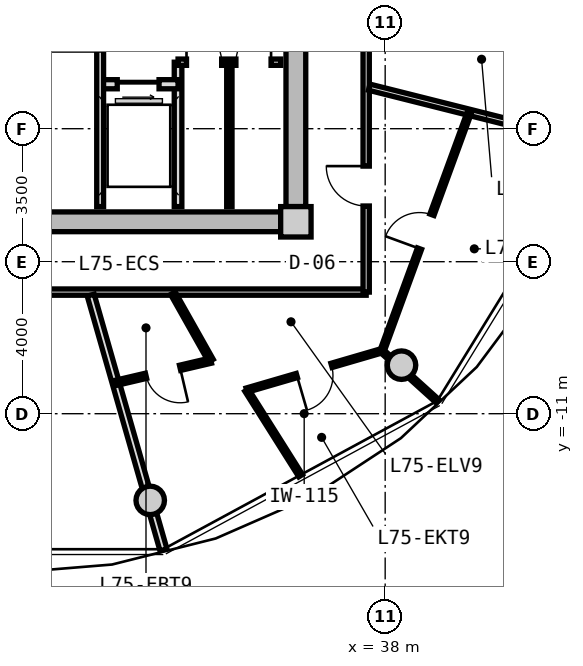
"""IFC4 building model, lengths in metres.
Left out: names, types, materials, properties, quantities, classifications, styles, units other than length and angle.
Written with IfcOpenShell. Run it as: python <this file> out.ifc"""

import sys

from ifc_helpers import new_model, si_unit, direction, frame, frame_2d, origin, origin_2d, place, context, subcontext, project, spatial, rectangle, circle, extrude, source, transform, mapped, element, fill, save


model = new_model("IFC4")
c1 = context("Model", 3, precision=1e-05, world=origin(), true_north=direction((0.0, 1.0)))
c2 = subcontext(c1, "Body", "Model", "MODEL_VIEW")
j1 = project(units=[si_unit("LENGTHUNIT", "METRE"), si_unit("PLANEANGLEUNIT", "RADIAN")], contexts=[c1])
p1 = place(None, origin())
s1 = spatial("IfcSite", under=j1, at=p1, CompositionType="ELEMENT")
p2 = place(p1, origin())
s2 = spatial("IfcBuilding", under=s1, at=p2, CompositionType="ELEMENT")
p3 = place(p2, frame((0.0, 0.0, 241.35)))
s3 = spatial("IfcBuildingStorey", under=s2, at=p3, CompositionType="ELEMENT", Elevation=241.35)
m1 = source(origin(), c2, "Body", "SweptSolid", [
    extrude(rectangle(XDim=0.8, YDim=0.8, at=origin_2d()), origin(), (0.0, 0.0, 1.0), 3.05),
])
p4 = place(p3, frame((35.65, -5.95, 0.0), z_axis=(0.0, 0.0, 1.0), x_axis=(1.0, 0.0, 0.0)))
e1 = element("IfcColumn", 1, at=p4, inside=s3, PredefinedType="COLUMN", context=c2, shape_type="MappedRepresentation", body=[
    mapped(m1, transform((0.0, 0.0, 0.0), x_axis=(1.0, 0.0, 0.0), y_axis=(0.0, 1.0, 0.0), z_axis=(0.0, 0.0, 1.0), scale=1.0)),
])
m2 = source(origin(), c2, "Body", "SweptSolid", [
    extrude(rectangle(XDim=14.5, YDim=0.52, at=frame_2d((7.25, 0.0))), origin(), (0.0, 0.0, 1.0), 2.73),
])
p5 = place(p3, frame((35.25, -5.95, 0.0), z_axis=(0.0, 0.0, 1.0), x_axis=(-1.0, 0.0, 0.0)))
e2 = element("IfcWall", 2, at=p5, inside=s3, PredefinedType="SHEAR", context=c2, shape_type="MappedRepresentation", body=[
    mapped(m2, transform((0.0, 0.0, 0.0), x_axis=(1.0, 0.0, 0.0), y_axis=(0.0, 1.0, 0.0), z_axis=(0.0, 0.0, 1.0), scale=1.0)),
])
m3 = source(origin(), c2, "Body", "SweptSolid", [
    extrude(rectangle(XDim=11.1, YDim=0.52, at=frame_2d((5.55, 0.0))), origin(), (0.0, 0.0, 1.0), 2.73),
])
p6 = place(p3, frame((35.65, 5.55, 0.0), z_axis=(0.0, 0.0, 1.0), x_axis=(0.0, -1.0, 0.0)))
e3 = element("IfcWall", 3, at=p6, inside=s3, PredefinedType="SHEAR", context=c2, shape_type="MappedRepresentation", body=[
    mapped(m3, transform((0.0, 0.0, 0.0), x_axis=(1.0, 0.0, 0.0), y_axis=(0.0, 1.0, 0.0), z_axis=(0.0, 0.0, 1.0), scale=1.0)),
])
p7 = place(p6, frame((5.65, 0.0, 0.0)))
e4 = element("IfcOpeningElement", 4, at=p7, cuts=e3, PredefinedType="OPENING", context=c2, shape_type="SweptSolid", body=[
    extrude(rectangle(XDim=1.2, YDim=2.15, at=frame_2d((0.6, 1.075))), frame((0.0, 0.27, 0.0), z_axis=(0.0, -1.0, 0.0), x_axis=(1.0, 0.0, 0.0)), (0.0, 0.0, 1.0), 0.54),
])
m4 = source(origin(), c2, "Body", "SweptSolid", [
    extrude(circle(Radius=0.375, at=origin_2d()), origin(), (0.0, 0.0, 1.0), 3.05),
])
for number, where, z_axis, x_axis in (
    (5, (31.818, -13.281, 0.0), (0.0, 0.0, 1.0), (1.0, 0.0, 0.0)),
    (6, (38.43, -9.723, 0.0), (0.0, 0.0, 1.0), (1.0, 0.0, 0.0)),
):
    element("IfcColumn", number, at=place(p3, frame(where, z_axis=z_axis, x_axis=x_axis)), inside=s3, PredefinedType="COLUMN", context=c2, shape_type="MappedRepresentation", body=[
        mapped(m4, transform((0.0, 0.0, 0.0), x_axis=(1.0, 0.0, 0.0), y_axis=(0.0, 1.0, 0.0), z_axis=(0.0, 0.0, 1.0), scale=1.0)),
    ])
m5 = source(origin(), c2, "Body", "SweptSolid", [
    extrude(rectangle(XDim=3.8, YDim=0.2, at=frame_2d((1.9, 0.0))), origin(), (0.0, 0.0, 1.0), 2.715),
])
p8 = place(p3, frame((32.55, -5.55, 0.0), z_axis=(0.0, 0.0, 1.0), x_axis=(0.0, 1.0, 0.0)))
e7 = element("IfcWall", 7, at=p8, inside=s3, PredefinedType="PARTITIONING", context=c2, shape_type="MappedRepresentation", body=[
    mapped(m5, transform((0.0, 0.0, 0.0), x_axis=(1.0, 0.0, 0.0), y_axis=(0.0, 1.0, 0.0), z_axis=(0.0, 0.0, 1.0), scale=1.0)),
])
m6 = source(origin(), c2, "Body", "SweptSolid", [
    extrude(rectangle(XDim=2.05, YDim=0.24, at=frame_2d((1.025, 0.0))), origin(), (0.0, 0.0, 1.0), 2.715),
])
p9 = place(p3, frame((30.5, -2.33, 0.0), z_axis=(0.0, 0.0, 1.0), x_axis=(1.0, 0.0, 0.0)))
e8 = element("IfcWall", 8, at=p9, inside=s3, PredefinedType="PARTITIONING", context=c2, shape_type="MappedRepresentation", body=[
    mapped(m6, transform((0.0, 0.0, 0.0), x_axis=(1.0, 0.0, 0.0), y_axis=(0.0, 1.0, 0.0), z_axis=(0.0, 0.0, 1.0), scale=1.0)),
])
p10 = place(p9, frame((0.45, 0.0, 0.0)))
e9 = element("IfcOpeningElement", 9, at=p10, cuts=e8, PredefinedType="OPENING", context=c2, shape_type="SweptSolid", body=[
    extrude(rectangle(XDim=1.1, YDim=2.2, at=frame_2d((0.55, 1.1))), frame((0.0, 0.13, 0.0), z_axis=(0.0, -1.0, 0.0), x_axis=(1.0, 0.0, 0.0)), (0.0, 0.0, 1.0), 0.26),
])
m7 = source(origin(), c2, "Body", "SweptSolid", [
    extrude(rectangle(XDim=4.2, YDim=0.18, at=frame_2d((2.1, 0.0))), origin(), (0.0, 0.0, 1.0), 2.715),
])
p11 = place(p3, frame((30.5, -5.55, 0.0), z_axis=(0.0, 0.0, 1.0), x_axis=(0.0, 1.0, 0.0)))
e10 = element("IfcWall", 10, at=p11, inside=s3, PredefinedType="PARTITIONING", context=c2, shape_type="MappedRepresentation", body=[
    mapped(m7, transform((0.0, 0.0, 0.0), x_axis=(1.0, 0.0, 0.0), y_axis=(0.0, 1.0, 0.0), z_axis=(0.0, 0.0, 1.0), scale=1.0)),
])
m8 = source(origin(), c2, "Body", "SweptSolid", [
    extrude(rectangle(XDim=2.7, YDim=0.165, at=frame_2d((1.35, 0.0))), origin(), (0.0, 0.0, 1.0), 2.715),
])
p12 = place(p3, frame((32.55, -1.75, 0.0), z_axis=(0.0, 0.0, 1.0), x_axis=(1.0, 0.0, 0.0)))
e11 = element("IfcWall", 11, at=p12, inside=s3, PredefinedType="PARTITIONING", context=c2, shape_type="MappedRepresentation", body=[
    mapped(m8, transform((0.0, 0.0, 0.0), x_axis=(1.0, 0.0, 0.0), y_axis=(0.0, 1.0, 0.0), z_axis=(0.0, 0.0, 1.0), scale=1.0)),
])
p13 = place(p12, frame((0.222, 0.0, 0.0)))
e12 = element("IfcOpeningElement", 12, at=p13, cuts=e11, PredefinedType="OPENING", context=c2, shape_type="SweptSolid", body=[
    extrude(rectangle(XDim=0.925, YDim=2.1, at=frame_2d((0.462, 1.05))), frame((0.0, 0.093, 0.0), z_axis=(0.0, -1.0, 0.0), x_axis=(1.0, 0.0, 0.0)), (0.0, 0.0, 1.0), 0.185),
])
p14 = place(p12, frame((1.522, 0.0, 0.0)))
e13 = element("IfcOpeningElement", 13, at=p14, cuts=e11, PredefinedType="OPENING", context=c2, shape_type="SweptSolid", body=[
    extrude(rectangle(XDim=0.925, YDim=2.1, at=frame_2d((0.462, 1.05))), frame((0.0, 0.093, 0.0), z_axis=(0.0, -1.0, 0.0), x_axis=(1.0, 0.0, 0.0)), (0.0, 0.0, 1.0), 0.185),
])
m9 = source(origin(), c2, "Body", "SweptSolid", [
    extrude(rectangle(XDim=3.8, YDim=0.14, at=frame_2d((1.9, 0.0))), origin(), (0.0, 0.0, 1.0), 2.715),
])
p15 = place(p3, frame((33.9, -5.55, 0.0), z_axis=(0.0, 0.0, 1.0), x_axis=(0.0, 1.0, 0.0)))
e14 = element("IfcWall", 14, at=p15, inside=s3, PredefinedType="PARTITIONING", context=c2, shape_type="MappedRepresentation", body=[
    mapped(m9, transform((0.0, 0.0, 0.0), x_axis=(1.0, 0.0, 0.0), y_axis=(0.0, 1.0, 0.0), z_axis=(0.0, 0.0, 1.0), scale=1.0)),
])
m10 = source(origin(), c2, "Body", "SweptSolid", [
    extrude(rectangle(XDim=19.0, YDim=0.165, at=frame_2d((9.5, 0.0))), origin(), (0.0, 0.0, 1.0), 2.715),
])
p16 = place(p3, frame((37.5, -7.8, 0.0), z_axis=(0.0, 0.0, 1.0), x_axis=(-1.0, 0.0, 0.0)))
e15 = element("IfcWall", 15, at=p16, inside=s3, PredefinedType="PARTITIONING", context=c2, shape_type="MappedRepresentation", body=[
    mapped(m10, transform((0.0, 0.0, 0.0), x_axis=(1.0, 0.0, 0.0), y_axis=(0.0, 1.0, 0.0), z_axis=(0.0, 0.0, 1.0), scale=1.0)),
])
p17 = place(p16, frame((12.373, 0.0, 0.0)))
e16 = element("IfcOpeningElement", 16, at=p17, cuts=e15, PredefinedType="OPENING", context=c2, shape_type="SweptSolid", body=[
    extrude(rectangle(XDim=1.25, YDim=2.2, at=frame_2d((0.625, 1.1))), frame((0.0, 0.093, 0.0), z_axis=(0.0, -1.0, 0.0), x_axis=(1.0, 0.0, 0.0)), (0.0, 0.0, 1.0), 0.185),
])
m11 = source(origin(), c2, "Body", "SweptSolid", [
    extrude(rectangle(XDim=6.88, YDim=0.165, at=frame_2d((3.44, 0.0))), origin(), (0.0, 0.0, 1.0), 2.715),
])
p18 = place(p3, frame((37.5, -0.92, 0.0), z_axis=(0.0, 0.0, 1.0), x_axis=(0.0, -1.0, 0.0)))
e17 = element("IfcWall", 17, at=p18, inside=s3, PredefinedType="PARTITIONING", context=c2, shape_type="MappedRepresentation", body=[
    mapped(m11, transform((0.0, 0.0, 0.0), x_axis=(1.0, 0.0, 0.0), y_axis=(0.0, 1.0, 0.0), z_axis=(0.0, 0.0, 1.0), scale=1.0)),
])
p19 = place(p18, frame((3.564, 0.0, 0.0)))
e18 = element("IfcOpeningElement", 18, at=p19, cuts=e17, PredefinedType="OPENING", context=c2, shape_type="SweptSolid", body=[
    extrude(rectangle(XDim=1.05, YDim=2.15, at=frame_2d((0.525, 1.075))), frame((0.0, 0.093, 0.0), z_axis=(0.0, -1.0, 0.0), x_axis=(1.0, 0.0, 0.0)), (0.0, 0.0, 1.0), 0.185),
])
m12 = source(origin(), c2, "Body", "SweptSolid", [
    extrude(rectangle(XDim=6.157, YDim=0.165, at=frame_2d((3.079, 0.0))), origin(), (0.0, 0.0, 1.0), 2.315),
])
p20 = place(p3, frame((37.58, -2.407, 0.0), z_axis=(0.0, 0.0, 1.0), x_axis=(0.969840867184, -0.243738984038, 0.0)))
e19 = element("IfcWall", 19, at=p20, inside=s3, PredefinedType="PARTITIONING", context=c2, shape_type="MappedRepresentation", body=[
    mapped(m12, transform((0.0, 0.0, 0.0), x_axis=(1.0, 0.0, 0.0), y_axis=(0.0, 1.0, 0.0), z_axis=(0.0, 0.0, 1.0), scale=1.0)),
])
m13 = source(origin(), c2, "Body", "SweptSolid", [
    extrude(rectangle(XDim=6.974, YDim=0.19, at=frame_2d((3.487, 0.0))), origin(), (0.0, 0.0, 1.0), 2.315),
])
p21 = place(p3, frame((30.251, -7.88, 0.0), z_axis=(0.0, 0.0, 1.0), x_axis=(0.274707256801, -0.961527910703, 0.0)))
e20 = element("IfcWall", 20, at=p21, inside=s3, PredefinedType="PARTITIONING", context=c2, shape_type="MappedRepresentation", body=[
    mapped(m13, transform((0.0, 0.0, 0.0), x_axis=(1.0, 0.0, 0.0), y_axis=(0.0, 1.0, 0.0), z_axis=(0.0, 0.0, 1.0), scale=1.0)),
])
m14 = source(origin(), c2, "Body", "SweptSolid", [
    extrude(rectangle(XDim=6.69, YDim=0.115, at=frame_2d((3.345, 0.0))), origin(), (0.0, 0.0, 1.0), 2.715),
])
p22 = place(p3, frame((37.917, -9.352, 0.0), z_axis=(0.0, 0.0, 1.0), x_axis=(0.343693784919, 0.939081776102, 0.0)))
e21 = element("IfcWall", 21, at=p22, inside=s3, PredefinedType="PARTITIONING", context=c2, shape_type="MappedRepresentation", body=[
    mapped(m14, transform((0.0, 0.0, 0.0), x_axis=(1.0, 0.0, 0.0), y_axis=(0.0, 1.0, 0.0), z_axis=(0.0, 0.0, 1.0), scale=1.0)),
])
p23 = place(p22, frame((2.87, 0.0, 0.0)))
e22 = element("IfcOpeningElement", 22, at=p23, cuts=e21, PredefinedType="OPENING", context=c2, shape_type="SweptSolid", body=[
    extrude(rectangle(XDim=0.95, YDim=2.1, at=frame_2d((0.475, 1.05))), frame((0.0, 0.067, 0.0), z_axis=(0.0, -1.0, 0.0), x_axis=(1.0, 0.0, 0.0)), (0.0, 0.0, 1.0), 0.135),
])
m15 = source(origin(), c2, "Body", "SweptSolid", [
    extrude(rectangle(XDim=1.977, YDim=0.115, at=frame_2d((0.989, 0.0))), origin(), (0.0, 0.0, 1.0), 2.315),
])
p24 = place(p3, frame((37.917, -9.352, 0.0), z_axis=(0.0, 0.0, 1.0), x_axis=(0.742064998629, -0.670327933037, 0.0)))
e23 = element("IfcWall", 23, at=p24, inside=s3, PredefinedType="PARTITIONING", context=c2, shape_type="MappedRepresentation", body=[
    mapped(m15, transform((0.0, 0.0, 0.0), x_axis=(1.0, 0.0, 0.0), y_axis=(0.0, 1.0, 0.0), z_axis=(0.0, 0.0, 1.0), scale=1.0)),
])
m16 = source(origin(), c2, "Body", "SweptSolid", [
    extrude(rectangle(XDim=2.035, YDim=0.14, at=frame_2d((1.018, 0.0))), origin(), (0.0, 0.0, 1.0), 2.715),
])
p25 = place(p3, frame((32.415, -7.83, 0.0), z_axis=(0.0, 0.0, 1.0), x_axis=(0.491092509169, -0.871107425888, 0.0)))
e24 = element("IfcWall", 24, at=p25, inside=s3, PredefinedType="PARTITIONING", context=c2, shape_type="MappedRepresentation", body=[
    mapped(m16, transform((0.0, 0.0, 0.0), x_axis=(1.0, 0.0, 0.0), y_axis=(0.0, 1.0, 0.0), z_axis=(0.0, 0.0, 1.0), scale=1.0)),
])
m17 = source(origin(), c2, "Body", "SweptSolid", [
    extrude(rectangle(XDim=2.586, YDim=0.14, at=frame_2d((1.293, 0.0))), origin(), (0.0, 0.0, 1.0), 2.715),
])
p26 = place(p3, frame((33.415, -9.603, 0.0), z_axis=(0.0, 0.0, 1.0), x_axis=(-0.973691298219, -0.227871138526, 0.0)))
e25 = element("IfcWall", 25, at=p26, inside=s3, PredefinedType="PARTITIONING", context=c2, shape_type="MappedRepresentation", body=[
    mapped(m17, transform((0.0, 0.0, 0.0), x_axis=(1.0, 0.0, 0.0), y_axis=(0.0, 1.0, 0.0), z_axis=(0.0, 0.0, 1.0), scale=1.0)),
])
p27 = place(p26, frame((0.833, 0.0, 0.0)))
e26 = element("IfcOpeningElement", 26, at=p27, cuts=e25, PredefinedType="OPENING", context=c2, shape_type="SweptSolid", body=[
    extrude(rectangle(XDim=0.92, YDim=2.1, at=frame_2d((0.46, 1.05))), frame((0.0, 0.08, 0.0), z_axis=(0.0, -1.0, 0.0), x_axis=(1.0, 0.0, 0.0)), (0.0, 0.0, 1.0), 0.16),
])
m18 = source(origin(), c2, "Body", "SweptSolid", [
    extrude(rectangle(XDim=2.662, YDim=0.115, at=frame_2d((1.331, 0.0))), origin(), (0.0, 0.0, 1.0), 2.715),
])
p28 = place(p3, frame((34.355, -10.38, 0.0), z_axis=(0.0, 0.0, 1.0), x_axis=(0.533547747092, -0.845769946009, 0.0)))
e27 = element("IfcWall", 27, at=p28, inside=s3, PredefinedType="PARTITIONING", context=c2, shape_type="MappedRepresentation", body=[
    mapped(m18, transform((0.0, 0.0, 0.0), x_axis=(1.0, 0.0, 0.0), y_axis=(0.0, 1.0, 0.0), z_axis=(0.0, 0.0, 1.0), scale=1.0)),
])
m19 = source(origin(), c2, "Body", "SweptSolid", [
    extrude(rectangle(XDim=3.702, YDim=0.115, at=frame_2d((1.851, 0.0))), origin(), (0.0, 0.0, 1.0), 2.715),
])
p29 = place(p3, frame((34.355, -10.38, 0.0), z_axis=(0.0, 0.0, 1.0), x_axis=(0.960044309887, 0.279848035645, 0.0)))
e28 = element("IfcWall", 28, at=p29, inside=s3, PredefinedType="PARTITIONING", context=c2, shape_type="MappedRepresentation", body=[
    mapped(m19, transform((0.0, 0.0, 0.0), x_axis=(1.0, 0.0, 0.0), y_axis=(0.0, 1.0, 0.0), z_axis=(0.0, 0.0, 1.0), scale=1.0)),
])
p30 = place(p29, frame((1.376, 0.0, 0.0)))
e29 = element("IfcOpeningElement", 29, at=p30, cuts=e28, PredefinedType="OPENING", context=c2, shape_type="SweptSolid", body=[
    extrude(rectangle(XDim=0.95, YDim=2.1, at=frame_2d((0.475, 1.05))), frame((0.0, 0.067, 0.0), z_axis=(0.0, -1.0, 0.0), x_axis=(1.0, 0.0, 0.0)), (0.0, 0.0, 1.0), 0.135),
])
m20 = source(origin(), c2, "Body", "SweptSolid", [
    extrude(rectangle(XDim=1.1, YDim=2.2, at=frame_2d((0.55, 1.1))), frame((0.0, 0.025, 0.0), z_axis=(0.0, -1.0, 0.0), x_axis=(1.0, 0.0, 0.0)), (0.0, 0.0, 1.0), 0.05),
])
p31 = place(p10, frame((1.1, 0.0, 0.0), z_axis=(0.0, 0.0, 1.0), x_axis=(-1.0, 0.0, 0.0)))
e30 = element("IfcDoor", 30, at=p31, inside=s3, OperationType="SLIDING_TO_RIGHT", PredefinedType="DOOR", context=c2, shape_type="MappedRepresentation", body=[
    mapped(m20, transform((0.0, 0.0, 0.0), x_axis=(1.0, 0.0, 0.0), y_axis=(0.0, 1.0, 0.0), z_axis=(0.0, 0.0, 1.0), scale=1.0)),
])
fill(e9, e30)
m21 = source(origin(), c2, "Body", "SweptSolid", [
    extrude(rectangle(XDim=0.925, YDim=2.1, at=frame_2d((0.462, 1.05))), frame((0.0, 0.025, 0.0), z_axis=(0.0, -1.0, 0.0), x_axis=(1.0, 0.0, 0.0)), (0.0, 0.0, 1.0), 0.05),
])
p32 = place(p13, origin())
e31 = element("IfcDoor", 31, at=p32, inside=s3, OperationType="SINGLE_SWING_LEFT", PredefinedType="DOOR", context=c2, shape_type="MappedRepresentation", body=[
    mapped(m21, transform((0.0, 0.0, 0.0), x_axis=(1.0, 0.0, 0.0), y_axis=(0.0, 1.0, 0.0), z_axis=(0.0, 0.0, 1.0), scale=1.0)),
])
fill(e12, e31)
p33 = place(p14, origin())
e32 = element("IfcDoor", 32, at=p33, inside=s3, OperationType="SINGLE_SWING_RIGHT", PredefinedType="DOOR", context=c2, shape_type="MappedRepresentation", body=[
    mapped(m21, transform((0.0, 0.0, 0.0), x_axis=(1.0, 0.0, 0.0), y_axis=(0.0, 1.0, 0.0), z_axis=(0.0, 0.0, 1.0), scale=1.0)),
])
fill(e13, e32)
m22 = source(origin(), c2, "Body", "SweptSolid", [
    extrude(rectangle(XDim=1.05, YDim=2.15, at=frame_2d((0.525, 1.075))), frame((0.0, 0.025, 0.0), z_axis=(0.0, -1.0, 0.0), x_axis=(1.0, 0.0, 0.0)), (0.0, 0.0, 1.0), 0.05),
])
p34 = place(p19, frame((1.05, 0.0, 0.0), z_axis=(0.0, 0.0, 1.0), x_axis=(-1.0, 0.0, 0.0)))
e33 = element("IfcDoor", 33, at=p34, inside=s3, OperationType="SINGLE_SWING_RIGHT", PredefinedType="DOOR", context=c2, shape_type="MappedRepresentation", body=[
    mapped(m22, transform((0.0, 0.0, 0.0), x_axis=(1.0, 0.0, 0.0), y_axis=(0.0, 1.0, 0.0), z_axis=(0.0, 0.0, 1.0), scale=1.0)),
])
fill(e18, e33)
m23 = source(origin(), c2, "Body", "SweptSolid", [
    extrude(rectangle(XDim=0.92, YDim=2.1, at=frame_2d((0.46, 1.05))), frame((0.0, 0.025, 0.0), z_axis=(0.0, -1.0, 0.0), x_axis=(1.0, 0.0, 0.0)), (0.0, 0.0, 1.0), 0.05),
])
p35 = place(p27, origin())
e34 = element("IfcDoor", 34, at=p35, inside=s3, OperationType="SINGLE_SWING_LEFT", PredefinedType="DOOR", context=c2, shape_type="MappedRepresentation", body=[
    mapped(m23, transform((0.0, 0.0, 0.0), x_axis=(1.0, 0.0, 0.0), y_axis=(0.0, 1.0, 0.0), z_axis=(0.0, 0.0, 1.0), scale=1.0)),
])
fill(e26, e34)
m24 = source(origin(), c2, "Body", "SweptSolid", [
    extrude(rectangle(XDim=0.95, YDim=2.1, at=frame_2d((0.475, 1.05))), frame((0.0, 0.025, 0.0), z_axis=(0.0, -1.0, 0.0), x_axis=(1.0, 0.0, 0.0)), (0.0, 0.0, 1.0), 0.05),
])
p36 = place(p30, frame((0.95, 0.0, 0.0), z_axis=(0.0, 0.0, 1.0), x_axis=(-1.0, 0.0, 0.0)))
e35 = element("IfcDoor", 35, at=p36, inside=s3, OperationType="SINGLE_SWING_RIGHT", PredefinedType="DOOR", context=c2, shape_type="MappedRepresentation", body=[
    mapped(m24, transform((0.0, 0.0, 0.0), x_axis=(1.0, 0.0, 0.0), y_axis=(0.0, 1.0, 0.0), z_axis=(0.0, 0.0, 1.0), scale=1.0)),
])
fill(e29, e35)
p37 = place(p23, origin())
e36 = element("IfcDoor", 36, at=p37, inside=s3, OperationType="SINGLE_SWING_LEFT", PredefinedType="DOOR", context=c2, shape_type="MappedRepresentation", body=[
    mapped(m24, transform((0.0, 0.0, 0.0), x_axis=(1.0, 0.0, 0.0), y_axis=(0.0, 1.0, 0.0), z_axis=(0.0, 0.0, 1.0), scale=1.0)),
])
fill(e22, e36)
save(model, sys.argv[1])
